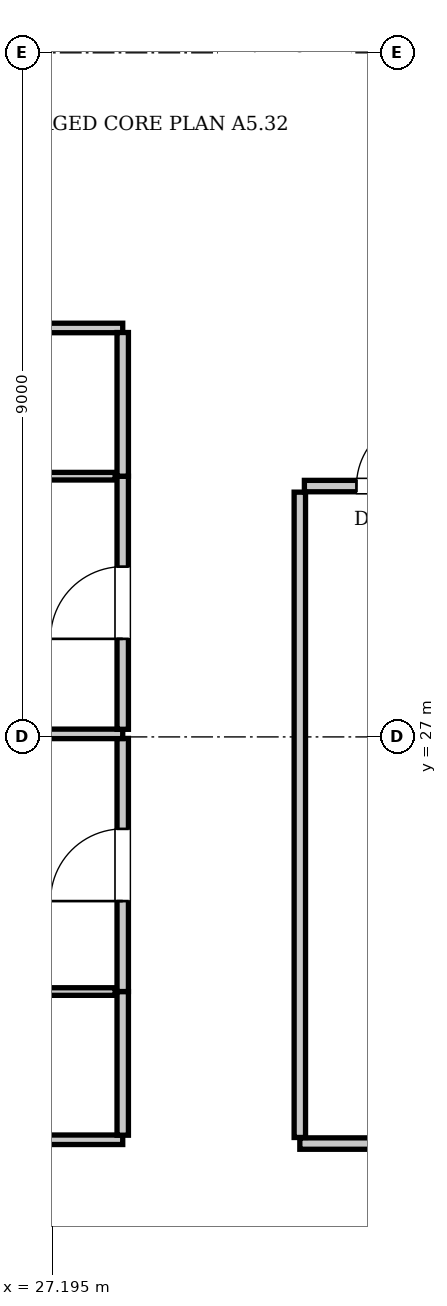
"""IFC4 building model, lengths in metres.
Left out: names, types, materials, properties, quantities, classifications, styles, units other than length and angle.
Written with IfcOpenShell. Run it as: python <this file> out.ifc"""

import sys

from ifc_helpers import new_model, si_unit, direction, frame, frame_2d, origin, place, context, subcontext, project, spatial, rectangle, extrude, element, fill, save


model = new_model("IFC4")
c1 = context("Model", 3, precision=1e-05, world=origin(), true_north=direction((0.0, 1.0)))
c2 = subcontext(c1, "Body", "Model", "MODEL_VIEW")
j1 = project(units=[si_unit("LENGTHUNIT", "METRE"), si_unit("PLANEANGLEUNIT", "RADIAN")], contexts=[c1])
p1 = place(None, origin())
s1 = spatial("IfcSite", under=j1, at=p1, CompositionType="ELEMENT")
p2 = place(p1, origin())
s2 = spatial("IfcBuilding", under=s1, at=p2, CompositionType="ELEMENT")
p3 = place(p2, frame((0.0, 0.0, 308.7)))
s3 = spatial("IfcBuildingStorey", under=s2, at=p3, CompositionType="ELEMENT", Elevation=308.7)
p4 = place(p3, frame((30.45, 21.65, 0.0), z_axis=(0.0, 0.0, 1.0), x_axis=(1.0, 0.0, 0.0)))
e1 = element("IfcWall", 1, at=p4, inside=s3, PredefinedType="PARTITIONING", context=c2, shape_type="SweptSolid", body=[
    extrude(rectangle(XDim=14.75, YDim=0.15, at=frame_2d((7.375, 0.0))), origin(), (0.0, 0.0, 1.0), 3.61),
])
p5 = place(p3, frame((30.45, 21.73, 0.0), z_axis=(0.0, 0.0, 1.0), x_axis=(0.0, 1.0, 0.0)))
e2 = element("IfcWall", 2, at=p5, inside=s3, PredefinedType="PARTITIONING", context=c2, shape_type="SweptSolid", body=[
    extrude(rectangle(XDim=8.49, YDim=0.15, at=frame_2d((4.245, 0.0))), origin(), (0.0, 0.0, 1.0), 3.61),
])
p6 = place(p3, frame((30.51, 30.3, 0.0), z_axis=(0.0, 0.0, 1.0), x_axis=(1.0, 0.0, 0.0)))
e3 = element("IfcWall", 3, at=p6, inside=s3, PredefinedType="PARTITIONING", context=c2, shape_type="SweptSolid", body=[
    extrude(rectangle(XDim=2.27, YDim=0.15, at=frame_2d((1.135, 0.0))), origin(), (0.0, 0.0, 1.0), 3.61),
])
p7 = place(p6, frame((0.685, 0.0, 0.0)))
e4 = element("IfcOpeningElement", 4, at=p7, cuts=e3, PredefinedType="OPENING", context=c2, shape_type="SweptSolid", body=[
    extrude(rectangle(XDim=0.9, YDim=2.1, at=frame_2d((0.45, 1.05))), frame((0.0, 0.085, 0.0), z_axis=(0.0, -1.0, 0.0), x_axis=(1.0, 0.0, 0.0)), (0.0, 0.0, 1.0), 0.17),
])
for number, where, z_axis, x_axis in (
    (5, (15.5, 21.7, 0.0), (0.0, 0.0, 1.0), (1.0, 0.0, 0.0)),
    (6, (15.5, 32.38, 0.0), (0.0, 0.0, 1.0), (1.0, 0.0, 0.0)),
):
    element("IfcWall", number, at=place(p3, frame(where, z_axis=z_axis, x_axis=x_axis)), inside=s3, PredefinedType="PARTITIONING", context=c2, shape_type="SweptSolid", body=[
        extrude(rectangle(XDim=12.62, YDim=0.125, at=frame_2d((6.31, 0.0))), origin(), (0.0, 0.0, 1.0), 3.61),
    ])
p8 = place(p3, frame((28.12, 21.76, 0.0), z_axis=(0.0, 0.0, 1.0), x_axis=(0.0, 1.0, 0.0)))
e7 = element("IfcWall", 7, at=p8, inside=s3, PredefinedType="PARTITIONING", context=c2, shape_type="SweptSolid", body=[
    extrude(rectangle(XDim=1.89, YDim=0.15, at=frame_2d((0.945, 0.0))), origin(), (0.0, 0.0, 1.0), 3.61),
])
p9 = place(p3, frame((28.12, 23.65, 0.0), z_axis=(0.0, 0.0, 1.0), x_axis=(0.0, 1.0, 0.0)))
e8 = element("IfcWall", 8, at=p9, inside=s3, PredefinedType="PARTITIONING", context=c2, shape_type="SweptSolid", body=[
    extrude(rectangle(XDim=3.33, YDim=0.15, at=frame_2d((1.665, 0.0))), origin(), (0.0, 0.0, 1.0), 3.61),
])
p10 = place(p9, frame((1.19, 0.0, 0.0)))
e9 = element("IfcOpeningElement", 9, at=p10, cuts=e8, PredefinedType="OPENING", context=c2, shape_type="SweptSolid", body=[
    extrude(rectangle(XDim=0.95, YDim=2.15, at=frame_2d((0.475, 1.075))), frame((0.0, 0.085, 0.0), z_axis=(0.0, -1.0, 0.0), x_axis=(1.0, 0.0, 0.0)), (0.0, 0.0, 1.0), 0.17),
])
p11 = place(p3, frame((25.72, 23.65, 0.0), z_axis=(0.0, 0.0, 1.0), x_axis=(1.0, 0.0, 0.0)))
e10 = element("IfcWall", 10, at=p11, inside=s3, PredefinedType="PARTITIONING", context=c2, shape_type="SweptSolid", body=[
    extrude(rectangle(XDim=2.3, YDim=0.1, at=frame_2d((1.15, 0.0))), origin(), (0.0, 0.0, 1.0), 3.61),
])
p12 = place(p11, frame((0.35, 0.0, 0.0)))
e11 = element("IfcOpeningElement", 11, at=p12, cuts=e10, PredefinedType="OPENING", context=c2, shape_type="SweptSolid", body=[
    extrude(rectangle(XDim=0.85, YDim=2.1, at=frame_2d((0.425, 1.05))), frame((0.0, 0.06, 0.0), z_axis=(0.0, -1.0, 0.0), x_axis=(1.0, 0.0, 0.0)), (0.0, 0.0, 1.0), 0.12),
])
p13 = place(p3, frame((15.5, 27.04, 0.0), z_axis=(0.0, 0.0, 1.0), x_axis=(1.0, 0.0, 0.0)))
e12 = element("IfcWall", 12, at=p13, inside=s3, PredefinedType="PARTITIONING", context=c2, shape_type="SweptSolid", body=[
    extrude(rectangle(XDim=12.62, YDim=0.125, at=frame_2d((6.31, 0.0))), origin(), (0.0, 0.0, 1.0), 2.41),
])
p14 = place(p3, frame((28.12, 27.1, 0.0), z_axis=(0.0, 0.0, 1.0), x_axis=(0.0, 1.0, 0.0)))
e13 = element("IfcWall", 13, at=p14, inside=s3, PredefinedType="PARTITIONING", context=c2, shape_type="SweptSolid", body=[
    extrude(rectangle(XDim=3.33, YDim=0.15, at=frame_2d((1.665, 0.0))), origin(), (0.0, 0.0, 1.0), 3.61),
])
p15 = place(p14, frame((1.19, 0.0, 0.0)))
e14 = element("IfcOpeningElement", 14, at=p15, cuts=e13, PredefinedType="OPENING", context=c2, shape_type="SweptSolid", body=[
    extrude(rectangle(XDim=0.95, YDim=2.15, at=frame_2d((0.475, 1.075))), frame((0.0, 0.085, 0.0), z_axis=(0.0, -1.0, 0.0), x_axis=(1.0, 0.0, 0.0)), (0.0, 0.0, 1.0), 0.17),
])
p16 = place(p3, frame((28.12, 30.43, 0.0), z_axis=(0.0, 0.0, 1.0), x_axis=(0.0, 1.0, 0.0)))
e15 = element("IfcWall", 15, at=p16, inside=s3, PredefinedType="PARTITIONING", context=c2, shape_type="SweptSolid", body=[
    extrude(rectangle(XDim=1.89, YDim=0.15, at=frame_2d((0.945, 0.0))), origin(), (0.0, 0.0, 1.0), 3.61),
])
p17 = place(p3, frame((25.72, 30.43, 0.0), z_axis=(0.0, 0.0, 1.0), x_axis=(1.0, 0.0, 0.0)))
e16 = element("IfcWall", 16, at=p17, inside=s3, PredefinedType="PARTITIONING", context=c2, shape_type="SweptSolid", body=[
    extrude(rectangle(XDim=2.3, YDim=0.1, at=frame_2d((1.15, 0.0))), origin(), (0.0, 0.0, 1.0), 3.61),
])
p18 = place(p17, frame((0.35, 0.0, 0.0)))
e17 = element("IfcOpeningElement", 17, at=p18, cuts=e16, PredefinedType="OPENING", context=c2, shape_type="SweptSolid", body=[
    extrude(rectangle(XDim=0.85, YDim=2.1, at=frame_2d((0.425, 1.05))), frame((0.0, 0.06, 0.0), z_axis=(0.0, -1.0, 0.0), x_axis=(1.0, 0.0, 0.0)), (0.0, 0.0, 1.0), 0.12),
])
p19 = place(p7, origin())
e18 = element("IfcDoor", 18, at=p19, inside=s3, OperationType="SINGLE_SWING_RIGHT", PredefinedType="DOOR", context=c2, shape_type="SweptSolid", body=[
    extrude(rectangle(XDim=0.9, YDim=2.1, at=frame_2d((0.45, 1.05))), frame((0.0, 0.025, 0.0), z_axis=(0.0, -1.0, 0.0), x_axis=(1.0, 0.0, 0.0)), (0.0, 0.0, 1.0), 0.05),
])
fill(e4, e18)
p20 = place(p10, origin())
e19 = element("IfcDoor", 19, at=p20, inside=s3, OperationType="SINGLE_SWING_LEFT", PredefinedType="DOOR", context=c2, shape_type="SweptSolid", body=[
    extrude(rectangle(XDim=0.95, YDim=2.15, at=frame_2d((0.475, 1.075))), frame((0.0, 0.025, 0.0), z_axis=(0.0, -1.0, 0.0), x_axis=(1.0, 0.0, 0.0)), (0.0, 0.0, 1.0), 0.05),
])
fill(e9, e19)
p21 = place(p15, origin())
e20 = element("IfcDoor", 20, at=p21, inside=s3, OperationType="SINGLE_SWING_LEFT", PredefinedType="DOOR", context=c2, shape_type="SweptSolid", body=[
    extrude(rectangle(XDim=0.95, YDim=2.15, at=frame_2d((0.475, 1.075))), frame((0.0, 0.025, 0.0), z_axis=(0.0, -1.0, 0.0), x_axis=(1.0, 0.0, 0.0)), (0.0, 0.0, 1.0), 0.05),
])
fill(e14, e20)
save(model, sys.argv[1])
